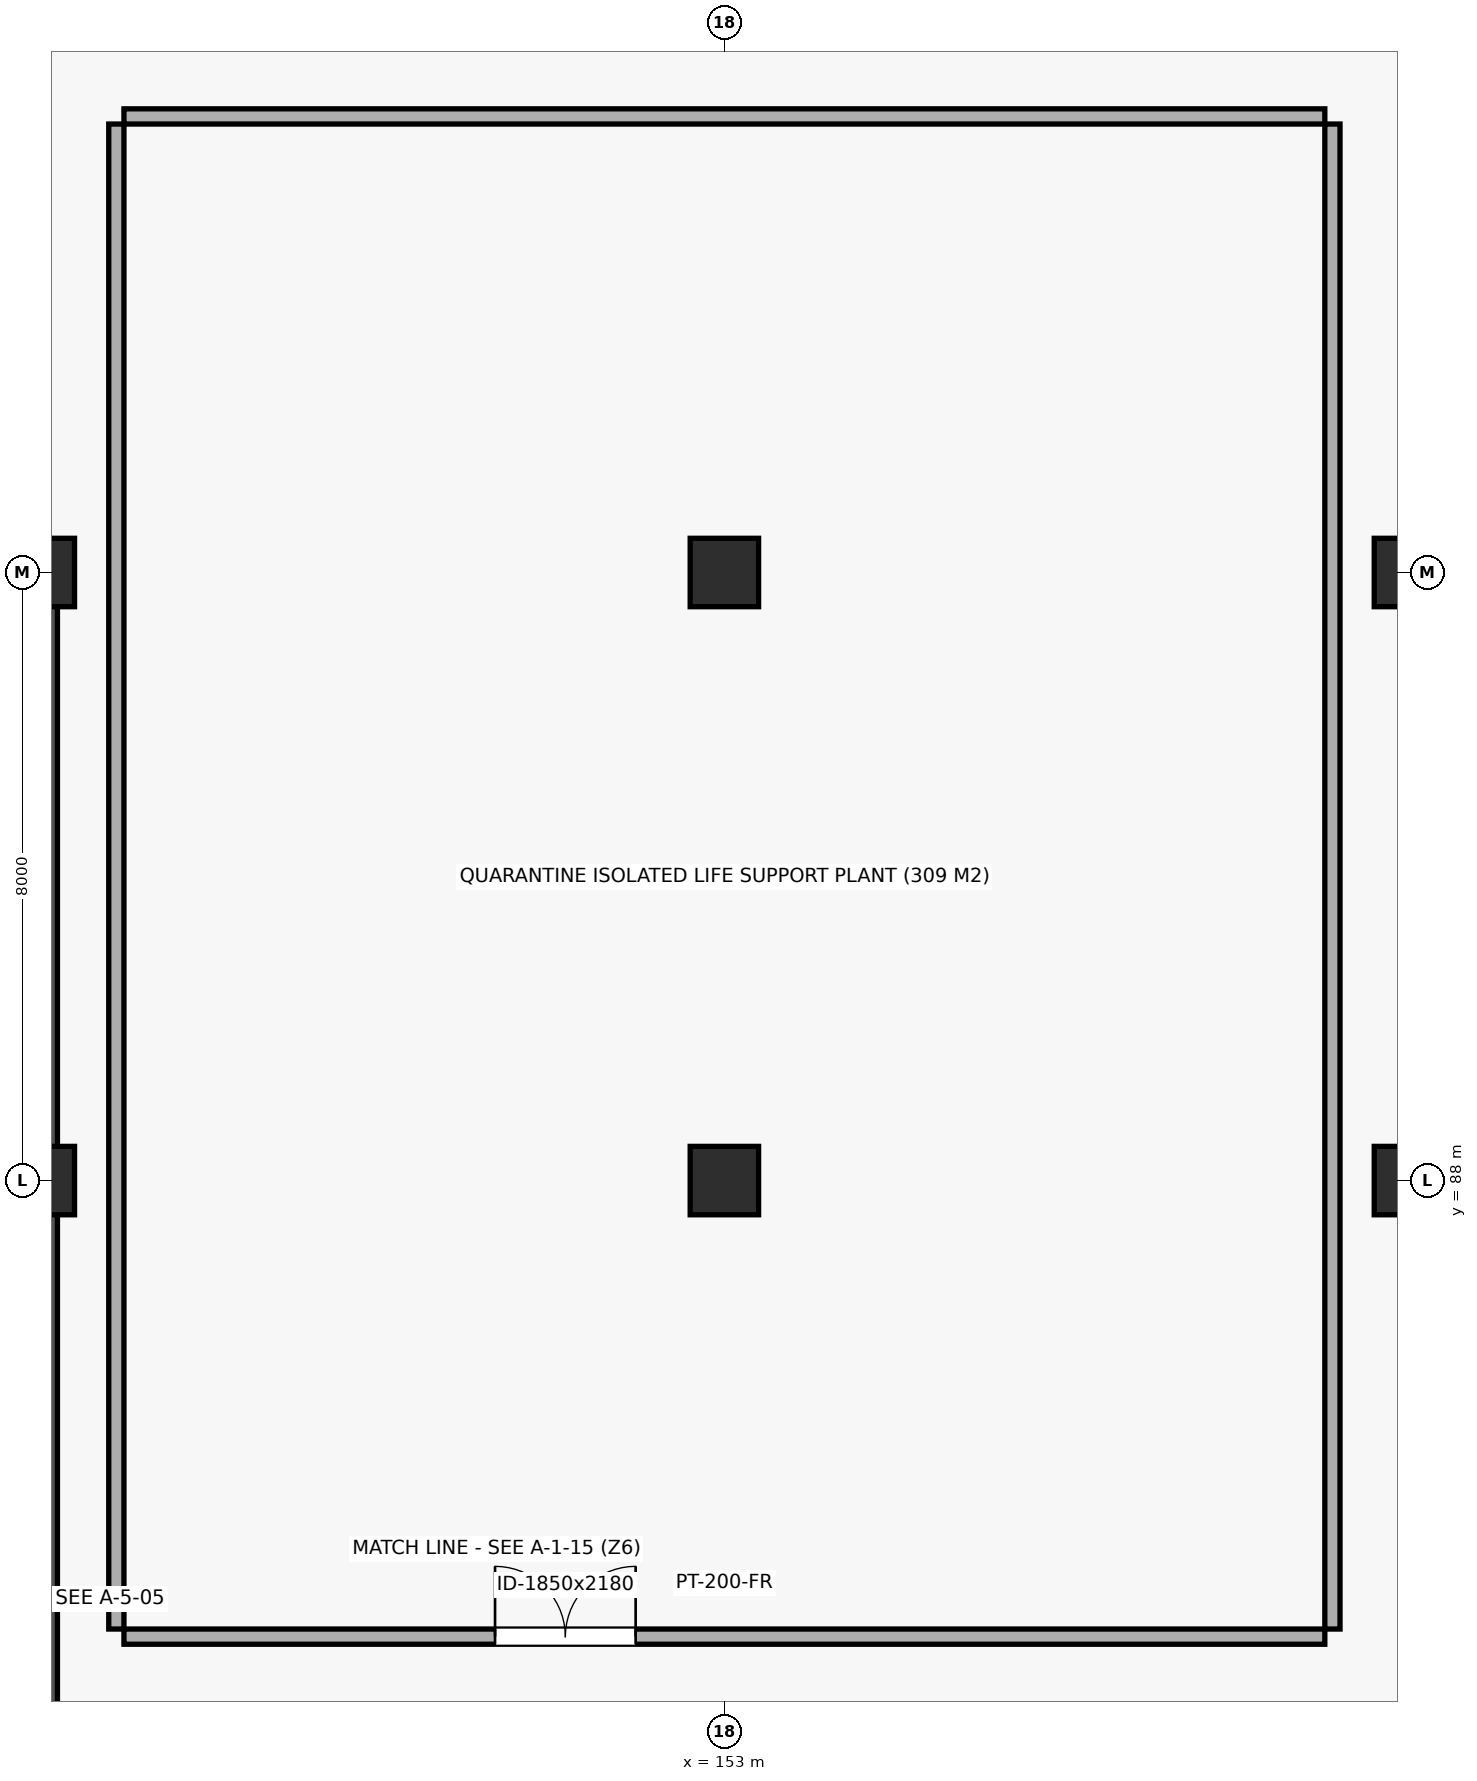
"""IFC4 building model, lengths in metres.
Left out: names, types, materials, properties, quantities, classifications, styles, units other than length and angle.
Written with IfcOpenShell. Run it as: python <this file> out.ifc"""

import sys

from ifc_helpers import new_model, si_unit, direction, frame, frame_2d, origin, origin_2d, place, context, subcontext, project, spatial, rectangle, extrude, element, fill, save


model = new_model("IFC4")
c1 = context("Model", 3, precision=1e-05, world=origin(), true_north=direction((0.0, 1.0)))
c2 = subcontext(c1, "Body", "Model", "MODEL_VIEW")
j1 = project(units=[si_unit("LENGTHUNIT", "METRE"), si_unit("PLANEANGLEUNIT", "RADIAN")], contexts=[c1])
p1 = place(None, origin())
s1 = spatial("IfcSite", under=j1, at=p1, CompositionType="ELEMENT")
p2 = place(p1, origin())
s2 = spatial("IfcBuilding", under=s1, at=p2, CompositionType="ELEMENT")
p3 = place(p2, frame((0.0, 0.0, -4.5)))
s3 = spatial("IfcBuildingStorey", under=s2, at=p3, CompositionType="ELEMENT", Elevation=-4.5)
for number, where, z_axis, x_axis in (
    (1, (144.0, 88.0, 0.0), (0.0, 0.0, 1.0), (1.0, 0.0, 0.0)),
    (2, (144.0, 96.0, 0.0), (0.0, 0.0, 1.0), (1.0, 0.0, 0.0)),
    (3, (153.0, 88.0, 0.0), (0.0, 0.0, 1.0), (1.0, 0.0, 0.0)),
    (4, (153.0, 96.0, 0.0), (0.0, 0.0, 1.0), (1.0, 0.0, 0.0)),
    (5, (162.0, 88.0, 0.0), (0.0, 0.0, 1.0), (1.0, 0.0, 0.0)),
    (6, (162.0, 96.0, 0.0), (0.0, 0.0, 1.0), (1.0, 0.0, 0.0)),
):
    element("IfcColumn", number, at=place(p3, frame(where, z_axis=z_axis, x_axis=x_axis)), inside=s3, PredefinedType="COLUMN", context=c2, shape_type="SweptSolid", body=[
        extrude(rectangle(XDim=0.9, YDim=0.9, at=origin_2d()), origin(), (0.0, 0.0, 1.0), 4.5),
    ])
p4 = place(p3, frame((144.0, 80.225, 0.0), z_axis=(0.0, 0.0, 1.0), x_axis=(0.0, 1.0, 0.0)))
e7 = element("IfcWall", 7, at=p4, inside=s3, PredefinedType="SHEAR", context=c2, shape_type="SweptSolid", body=[
    extrude(rectangle(XDim=15.55, YDim=0.45, at=frame_2d((7.775, 0.0))), origin(), (0.0, 0.0, 1.0), 4.15),
])
p5 = place(p3, frame((145.1, 82.0, 0.0), z_axis=(0.0, 0.0, 1.0), x_axis=(1.0, 0.0, 0.0)))
e8 = element("IfcWall", 8, at=p5, inside=s3, PredefinedType="PARTITIONING", context=c2, shape_type="SweptSolid", body=[
    extrude(rectangle(XDim=15.8, YDim=0.2, at=frame_2d((7.9, 0.0))), origin(), (0.0, 0.0, 1.0), 4.15),
])
p6 = place(p5, frame((4.883, 0.0, 0.0)))
e9 = element("IfcOpeningElement", 9, at=p6, cuts=e8, PredefinedType="OPENING", context=c2, shape_type="SweptSolid", body=[
    extrude(rectangle(XDim=1.85, YDim=2.18, at=frame_2d((0.925, 1.09))), frame((0.0, 0.112, 0.0), z_axis=(0.0, -1.0, 0.0), x_axis=(1.0, 0.0, 0.0)), (0.0, 0.0, 1.0), 0.224),
])
p7 = place(p3, frame((145.1, 102.0, 0.0), z_axis=(0.0, 0.0, 1.0), x_axis=(1.0, 0.0, 0.0)))
e10 = element("IfcWall", 10, at=p7, inside=s3, PredefinedType="PARTITIONING", context=c2, shape_type="SweptSolid", body=[
    extrude(rectangle(XDim=15.8, YDim=0.2, at=frame_2d((7.9, 0.0))), origin(), (0.0, 0.0, 1.0), 4.15),
])
for number, where, z_axis, x_axis in (
    (11, (145.0, 82.1, 0.0), (0.0, 0.0, 1.0), (0.0, 1.0, 0.0)),
    (12, (161.0, 82.1, 0.0), (0.0, 0.0, 1.0), (0.0, 1.0, 0.0)),
):
    element("IfcWall", number, at=place(p3, frame(where, z_axis=z_axis, x_axis=x_axis)), inside=s3, PredefinedType="PARTITIONING", context=c2, shape_type="SweptSolid", body=[
        extrude(rectangle(XDim=19.8, YDim=0.2, at=frame_2d((9.9, 0.0))), origin(), (0.0, 0.0, 1.0), 4.15),
    ])
p8 = place(p6, origin())
e13 = element("IfcDoor", 13, at=p8, inside=s3, OperationType="DOUBLE_DOOR_SINGLE_SWING", PredefinedType="DOOR", context=c2, shape_type="SweptSolid", body=[
    extrude(rectangle(XDim=1.85, YDim=2.18, at=frame_2d((0.925, 1.09))), frame((0.0, 0.025, 0.0), z_axis=(0.0, -1.0, 0.0), x_axis=(1.0, 0.0, 0.0)), (0.0, 0.0, 1.0), 0.05),
])
fill(e9, e13)
save(model, sys.argv[1])
